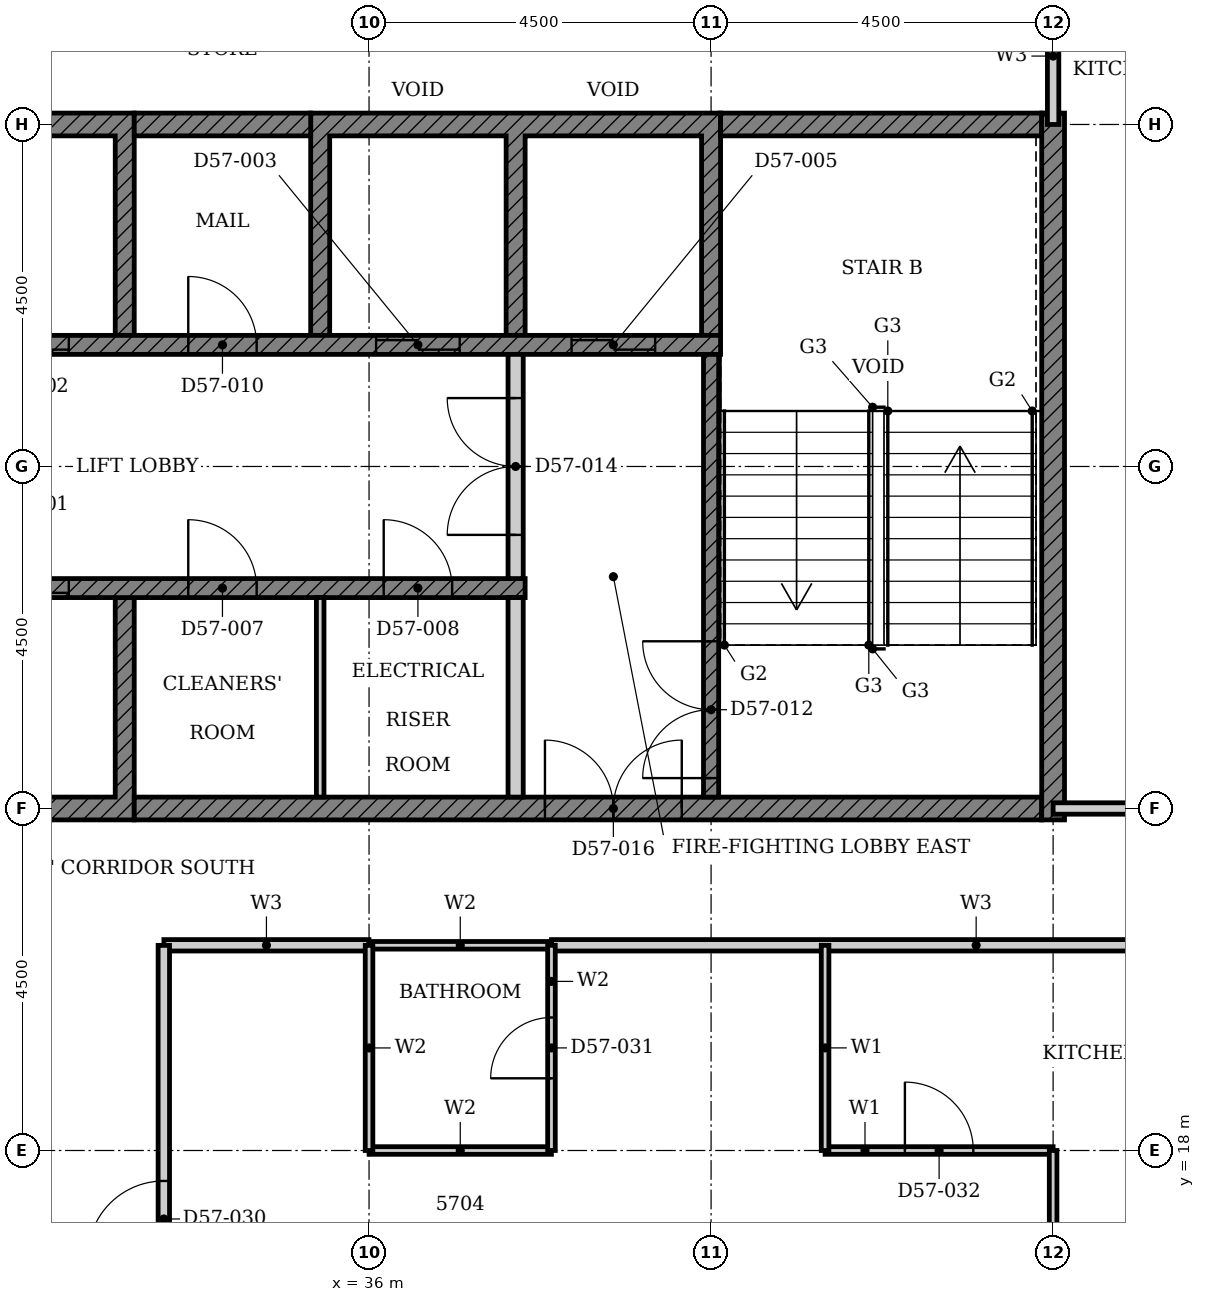
"""IFC4 building model, lengths in metres.
Left out: names, types, materials, properties, quantities, classifications, styles, units other than length and angle.
Written with IfcOpenShell. Run it as: python <this file> out.ifc"""

import sys

from ifc_helpers import new_model, si_unit, direction, frame, frame_2d, origin, place, context, subcontext, project, spatial, polyline, rectangle, outline, extrude, element, fill, save


model = new_model("IFC4")
c1 = context("Model", 3, precision=1e-05, world=origin(), true_north=direction((0.0, 1.0)))
c2 = subcontext(c1, "Body", "Model", "MODEL_VIEW")
j1 = project(units=[si_unit("LENGTHUNIT", "METRE"), si_unit("PLANEANGLEUNIT", "RADIAN")], contexts=[c1])
p1 = place(None, origin())
s1 = spatial("IfcSite", under=j1, at=p1, CompositionType="ELEMENT")
p2 = place(p1, origin())
s2 = spatial("IfcBuilding", under=s1, at=p2, CompositionType="ELEMENT")
p3 = place(p2, frame((0.0, 0.0, 225.7)))
s3 = spatial("IfcBuildingStorey", under=s2, at=p3, CompositionType="ELEMENT", Elevation=225.7)
p4 = place(p3, origin())
e1 = element("IfcWall", 1, at=p4, inside=s3, PredefinedType="SHEAR", context=c2, shape_type="SweptSolid", body=[
    extrude(outline(polyline([(27.518, 22.35), (32.911, 22.35), (32.911, 25.275), (32.661, 25.275), (32.661, 22.65), (30.339, 22.65), (30.339, 25.275), (30.089, 25.275), (30.089, 22.65), (27.768, 22.65), (27.768, 25.275), (27.518, 25.275), (27.518, 22.35)])), origin(), (0.0, 0.0, 1.0), 3.4),
])
p5 = place(p3, origin())
e2 = element("IfcWall", 2, at=p5, inside=s3, PredefinedType="SHEAR", context=c2, shape_type="SweptSolid", body=[
    extrude(outline(polyline([(27.518, 28.725), (27.768, 28.725), (27.768, 31.35), (30.089, 31.35), (30.089, 28.725), (30.339, 28.725), (30.339, 31.35), (32.661, 31.35), (32.661, 28.725), (32.911, 28.725), (32.911, 31.65), (27.518, 31.65), (27.518, 28.725)])), origin(), (0.0, 0.0, 1.0), 3.4),
])
p6 = place(p3, origin())
e3 = element("IfcWall", 3, at=p6, inside=s3, PredefinedType="SHEAR", context=c2, shape_type="SweptSolid", body=[
    extrude(outline(polyline([(35.232, 28.725), (35.482, 28.725), (35.482, 31.35), (37.803, 31.35), (37.803, 28.725), (38.053, 28.725), (38.053, 31.35), (40.375, 31.35), (40.375, 28.725), (40.625, 28.725), (40.625, 31.65), (35.232, 31.65), (35.232, 28.725)])), origin(), (0.0, 0.0, 1.0), 3.4),
])
p7 = place(p3, frame((32.911, 22.5, 0.0), z_axis=(0.0, 0.0, 1.0), x_axis=(1.0, 0.0, 0.0)))
e4 = element("IfcWall", 4, at=p7, inside=s3, PredefinedType="SHEAR", context=c2, shape_type="SweptSolid", body=[
    extrude(rectangle(XDim=11.939, YDim=0.3, at=frame_2d((5.97, 0.0))), origin(), (0.0, 0.0, 1.0), 3.4),
])
p8 = place(p7, frame((5.404, 0.0, 0.0)))
e5 = element("IfcOpeningElement", 5, at=p8, cuts=e4, PredefinedType="OPENING", context=c2, shape_type="SweptSolid", body=[
    extrude(rectangle(XDim=1.8, YDim=2.1, at=frame_2d((0.9, 1.05))), frame((0.0, 0.16, 0.0), z_axis=(0.0, -1.0, 0.0), x_axis=(1.0, 0.0, 0.0)), (0.0, 0.0, 1.0), 0.32),
])
p9 = place(p3, frame((32.911, 31.5, 0.0), z_axis=(0.0, 0.0, 1.0), x_axis=(1.0, 0.0, 0.0)))
e6 = element("IfcWall", 6, at=p9, inside=s3, PredefinedType="SHEAR", context=c2, shape_type="SweptSolid", body=[
    extrude(rectangle(XDim=2.322, YDim=0.3, at=frame_2d((1.161, 0.0))), origin(), (0.0, 0.0, 1.0), 3.4),
])
p10 = place(p3, frame((40.625, 31.5, 0.0), z_axis=(0.0, 0.0, 1.0), x_axis=(1.0, 0.0, 0.0)))
e7 = element("IfcWall", 7, at=p10, inside=s3, PredefinedType="SHEAR", context=c2, shape_type="SweptSolid", body=[
    extrude(rectangle(XDim=4.225, YDim=0.3, at=frame_2d((2.113, 0.0))), origin(), (0.0, 0.0, 1.0), 3.4),
])
p11 = place(p3, frame((45.0, 22.35, 0.0), z_axis=(0.0, 0.0, 1.0), x_axis=(0.0, 1.0, 0.0)))
e8 = element("IfcWall", 8, at=p11, inside=s3, PredefinedType="SHEAR", context=c2, shape_type="SweptSolid", body=[
    extrude(rectangle(XDim=9.3, YDim=0.3, at=frame_2d((4.65, 0.0))), origin(), (0.0, 0.0, 1.0), 3.4),
])
p12 = place(p3, frame((22.375, 25.4, 0.0), z_axis=(0.0, 0.0, 1.0), x_axis=(1.0, 0.0, 0.0)))
e9 = element("IfcWall", 9, at=p12, inside=s3, PredefinedType="SHEAR", context=c2, shape_type="SweptSolid", body=[
    extrude(rectangle(XDim=15.678, YDim=0.25, at=frame_2d((7.839, 0.0))), origin(), (0.0, 0.0, 1.0), 3.4),
])
p13 = place(p12, frame((8.575, 0.0, 0.0)))
e10 = element("IfcOpeningElement", 10, at=p13, cuts=e9, PredefinedType="OPENING", context=c2, shape_type="SweptSolid", body=[
    extrude(rectangle(XDim=1.1, YDim=2.1, at=frame_2d((0.55, 1.05))), frame((0.0, 0.135, 0.0), z_axis=(0.0, -1.0, 0.0), x_axis=(1.0, 0.0, 0.0)), (0.0, 0.0, 1.0), 0.27),
])
p14 = place(p12, frame((0.861, 0.0, 0.0)))
e11 = element("IfcOpeningElement", 11, at=p14, cuts=e9, PredefinedType="OPENING", context=c2, shape_type="SweptSolid", body=[
    extrude(rectangle(XDim=1.1, YDim=2.1, at=frame_2d((0.55, 1.05))), frame((0.0, 0.135, 0.0), z_axis=(0.0, -1.0, 0.0), x_axis=(1.0, 0.0, 0.0)), (0.0, 0.0, 1.0), 0.27),
])
p15 = place(p12, frame((3.532, 0.0, 0.0)))
e12 = element("IfcOpeningElement", 12, at=p15, cuts=e9, PredefinedType="OPENING", context=c2, shape_type="SweptSolid", body=[
    extrude(rectangle(XDim=0.9, YDim=2.1, at=frame_2d((0.45, 1.05))), frame((0.0, 0.135, 0.0), z_axis=(0.0, -1.0, 0.0), x_axis=(1.0, 0.0, 0.0)), (0.0, 0.0, 1.0), 0.27),
])
p16 = place(p12, frame((11.246, 0.0, 0.0)))
e13 = element("IfcOpeningElement", 13, at=p16, cuts=e9, PredefinedType="OPENING", context=c2, shape_type="SweptSolid", body=[
    extrude(rectangle(XDim=0.9, YDim=2.1, at=frame_2d((0.45, 1.05))), frame((0.0, 0.135, 0.0), z_axis=(0.0, -1.0, 0.0), x_axis=(1.0, 0.0, 0.0)), (0.0, 0.0, 1.0), 0.27),
])
p17 = place(p12, frame((13.818, 0.0, 0.0)))
e14 = element("IfcOpeningElement", 14, at=p17, cuts=e9, PredefinedType="OPENING", context=c2, shape_type="SweptSolid", body=[
    extrude(rectangle(XDim=0.9, YDim=2.1, at=frame_2d((0.45, 1.05))), frame((0.0, 0.135, 0.0), z_axis=(0.0, -1.0, 0.0), x_axis=(1.0, 0.0, 0.0)), (0.0, 0.0, 1.0), 0.27),
])
p18 = place(p3, frame((24.947, 28.6, 0.0), z_axis=(0.0, 0.0, 1.0), x_axis=(1.0, 0.0, 0.0)))
e15 = element("IfcWall", 15, at=p18, inside=s3, PredefinedType="SHEAR", context=c2, shape_type="SweptSolid", body=[
    extrude(rectangle(XDim=15.678, YDim=0.25, at=frame_2d((7.839, 0.0))), origin(), (0.0, 0.0, 1.0), 3.4),
])
p19 = place(p18, frame((6.004, 0.0, 0.0)))
e16 = element("IfcOpeningElement", 16, at=p19, cuts=e15, PredefinedType="OPENING", context=c2, shape_type="SweptSolid", body=[
    extrude(rectangle(XDim=1.1, YDim=2.1, at=frame_2d((0.55, 1.05))), frame((0.0, 0.135, 0.0), z_axis=(0.0, -1.0, 0.0), x_axis=(1.0, 0.0, 0.0)), (0.0, 0.0, 1.0), 0.27),
])
p20 = place(p18, frame((11.146, 0.0, 0.0)))
e17 = element("IfcOpeningElement", 17, at=p20, cuts=e15, PredefinedType="OPENING", context=c2, shape_type="SweptSolid", body=[
    extrude(rectangle(XDim=1.1, YDim=2.1, at=frame_2d((0.55, 1.05))), frame((0.0, 0.135, 0.0), z_axis=(0.0, -1.0, 0.0), x_axis=(1.0, 0.0, 0.0)), (0.0, 0.0, 1.0), 0.27),
])
p21 = place(p18, frame((13.718, 0.0, 0.0)))
e18 = element("IfcOpeningElement", 18, at=p21, cuts=e15, PredefinedType="OPENING", context=c2, shape_type="SweptSolid", body=[
    extrude(rectangle(XDim=1.1, YDim=2.1, at=frame_2d((0.55, 1.05))), frame((0.0, 0.135, 0.0), z_axis=(0.0, -1.0, 0.0), x_axis=(1.0, 0.0, 0.0)), (0.0, 0.0, 1.0), 0.27),
])
p22 = place(p18, frame((0.961, 0.0, 0.0)))
e19 = element("IfcOpeningElement", 19, at=p22, cuts=e15, PredefinedType="OPENING", context=c2, shape_type="SweptSolid", body=[
    extrude(rectangle(XDim=0.9, YDim=2.1, at=frame_2d((0.45, 1.05))), frame((0.0, 0.135, 0.0), z_axis=(0.0, -1.0, 0.0), x_axis=(1.0, 0.0, 0.0)), (0.0, 0.0, 1.0), 0.27),
])
p23 = place(p18, frame((8.675, 0.0, 0.0)))
e20 = element("IfcOpeningElement", 20, at=p23, cuts=e15, PredefinedType="OPENING", context=c2, shape_type="SweptSolid", body=[
    extrude(rectangle(XDim=0.9, YDim=2.1, at=frame_2d((0.45, 1.05))), frame((0.0, 0.135, 0.0), z_axis=(0.0, -1.0, 0.0), x_axis=(1.0, 0.0, 0.0)), (0.0, 0.0, 1.0), 0.27),
])
p24 = place(p3, frame((37.928, 22.65, 0.0), z_axis=(0.0, 0.0, 1.0), x_axis=(0.0, 1.0, 0.0)))
e21 = element("IfcWall", 21, at=p24, inside=s3, PredefinedType="PARTITIONING", context=c2, shape_type="SweptSolid", body=[
    extrude(rectangle(XDim=2.625, YDim=0.2, at=frame_2d((1.312, 0.0))), origin(), (0.0, 0.0, 1.0), 3.4),
])
p25 = place(p3, frame((35.357, 22.65, 0.0), z_axis=(0.0, 0.0, 1.0), x_axis=(0.0, 1.0, 0.0)))
e22 = element("IfcWall", 22, at=p25, inside=s3, PredefinedType="PARTITIONING", context=c2, shape_type="SweptSolid", body=[
    extrude(rectangle(XDim=2.625, YDim=0.1, at=frame_2d((1.312, 0.0))), origin(), (0.0, 0.0, 1.0), 3.4),
])
p26 = place(p3, frame((40.5, 22.65, 0.0), z_axis=(0.0, 0.0, 1.0), x_axis=(0.0, 1.0, 0.0)))
e23 = element("IfcWall", 23, at=p26, inside=s3, PredefinedType="SHEAR", context=c2, shape_type="SweptSolid", body=[
    extrude(rectangle(XDim=5.825, YDim=0.2, at=frame_2d((2.913, 0.0))), origin(), (0.0, 0.0, 1.0), 3.4),
])
p27 = place(p26, frame((0.25, 0.0, 0.0)))
e24 = element("IfcOpeningElement", 24, at=p27, cuts=e23, PredefinedType="OPENING", context=c2, shape_type="SweptSolid", body=[
    extrude(rectangle(XDim=1.8, YDim=2.1, at=frame_2d((0.9, 1.05))), frame((0.0, 0.11, 0.0), z_axis=(0.0, -1.0, 0.0), x_axis=(1.0, 0.0, 0.0)), (0.0, 0.0, 1.0), 0.22),
])
p28 = place(p3, frame((37.928, 25.525, 0.0), z_axis=(0.0, 0.0, 1.0), x_axis=(0.0, 1.0, 0.0)))
e25 = element("IfcWall", 25, at=p28, inside=s3, PredefinedType="PARTITIONING", context=c2, shape_type="SweptSolid", body=[
    extrude(rectangle(XDim=2.95, YDim=0.2, at=frame_2d((1.475, 0.0))), origin(), (0.0, 0.0, 1.0), 3.4),
])
p29 = place(p28, frame((0.575, 0.0, 0.0)))
e26 = element("IfcOpeningElement", 26, at=p29, cuts=e25, PredefinedType="OPENING", context=c2, shape_type="SweptSolid", body=[
    extrude(rectangle(XDim=1.8, YDim=2.1, at=frame_2d((0.9, 1.05))), frame((0.0, 0.11, 0.0), z_axis=(0.0, -1.0, 0.0), x_axis=(1.0, 0.0, 0.0)), (0.0, 0.0, 1.0), 0.22),
])
p30 = place(p3, frame((33.301, 20.7, 0.0), z_axis=(0.0, 0.0, 1.0), x_axis=(1.0, 0.0, 0.0)))
e27 = element("IfcWall", 27, at=p30, inside=s3, PredefinedType="PARTITIONING", context=c2, shape_type="SweptSolid", body=[
    extrude(rectangle(XDim=2.698, YDim=0.15, at=frame_2d((1.349, 0.0))), origin(), (0.0, 0.0, 1.0), 3.4),
])
p31 = place(p3, frame((38.4, 20.7, 0.0), z_axis=(0.0, 0.0, 1.0), x_axis=(1.0, 0.0, 0.0)))
e28 = element("IfcWall", 28, at=p31, inside=s3, PredefinedType="PARTITIONING", context=c2, shape_type="SweptSolid", body=[
    extrude(rectangle(XDim=11.175, YDim=0.15, at=frame_2d((5.587, 0.0))), origin(), (0.0, 0.0, 1.0), 3.4),
])
p32 = place(p3, frame((45.0, 22.5, 0.0), z_axis=(0.0, 0.0, 1.0), x_axis=(1.0, 0.0, 0.0)))
e29 = element("IfcWall", 29, at=p32, inside=s3, PredefinedType="PARTITIONING", context=c2, shape_type="SweptSolid", body=[
    extrude(rectangle(XDim=4.765, YDim=0.15, at=frame_2d((2.382, 0.0))), origin(), (0.0, 0.0, 1.0), 3.4),
])
p33 = place(p32, frame((1.75, 0.0, 0.0)))
e30 = element("IfcOpeningElement", 30, at=p33, cuts=e29, PredefinedType="OPENING", context=c2, shape_type="SweptSolid", body=[
    extrude(rectangle(XDim=1.0, YDim=2.2, at=frame_2d((0.5, 1.1))), frame((0.0, 0.085, 0.0), z_axis=(0.0, -1.0, 0.0), x_axis=(1.0, 0.0, 0.0)), (0.0, 0.0, 1.0), 0.17),
])
p34 = place(p3, frame((33.3, 4.5, 0.0), z_axis=(0.0, 0.0, 1.0), x_axis=(0.0, 1.0, 0.0)))
e31 = element("IfcWall", 31, at=p34, inside=s3, PredefinedType="PARTITIONING", context=c2, shape_type="SweptSolid", body=[
    extrude(rectangle(XDim=16.199, YDim=0.15, at=frame_2d((8.1, 0.0))), origin(), (0.0, 0.0, 1.0), 3.4),
])
p35 = place(p34, frame((12.099, 0.0, 0.0)))
e32 = element("IfcOpeningElement", 32, at=p35, cuts=e31, PredefinedType="OPENING", context=c2, shape_type="SweptSolid", body=[
    extrude(rectangle(XDim=1.0, YDim=2.2, at=frame_2d((0.5, 1.1))), frame((0.0, 0.085, 0.0), z_axis=(0.0, -1.0, 0.0), x_axis=(1.0, 0.0, 0.0)), (0.0, 0.0, 1.0), 0.17),
])
p36 = place(p34, frame((4.0, 0.0, 0.0)))
e33 = element("IfcOpeningElement", 33, at=p36, cuts=e31, PredefinedType="OPENING", context=c2, shape_type="SweptSolid", body=[
    extrude(rectangle(XDim=1.0, YDim=2.1, at=frame_2d((0.5, 1.05))), frame((0.0, 0.085, 0.0), z_axis=(0.0, -1.0, 0.0), x_axis=(1.0, 0.0, 0.0)), (0.0, 0.0, 1.0), 0.17),
])
p37 = place(p3, frame((45.0, 31.5, 0.0), z_axis=(0.0, 0.0, 1.0), x_axis=(0.0, 1.0, 0.0)))
e34 = element("IfcWall", 34, at=p37, inside=s3, PredefinedType="PARTITIONING", context=c2, shape_type="SweptSolid", body=[
    extrude(rectangle(XDim=1.8, YDim=0.15, at=frame_2d((0.9, 0.0))), origin(), (0.0, 0.0, 1.0), 3.4),
])
p38 = place(p3, frame((42.0, 18.0, 0.0), z_axis=(0.0, 0.0, 1.0), x_axis=(1.0, 0.0, 0.0)))
e35 = element("IfcWall", 35, at=p38, inside=s3, PredefinedType="PARTITIONING", context=c2, shape_type="SweptSolid", body=[
    extrude(rectangle(XDim=3.0, YDim=0.1, at=frame_2d((1.5, 0.0))), origin(), (0.0, 0.0, 1.0), 3.4),
])
p39 = place(p38, frame((1.05, 0.0, 0.0)))
e36 = element("IfcOpeningElement", 36, at=p39, cuts=e35, PredefinedType="OPENING", context=c2, shape_type="SweptSolid", body=[
    extrude(rectangle(XDim=0.9, YDim=2.1, at=frame_2d((0.45, 1.05))), frame((0.0, 0.06, 0.0), z_axis=(0.0, -1.0, 0.0), x_axis=(1.0, 0.0, 0.0)), (0.0, 0.0, 1.0), 0.12),
])
p40 = place(p3, frame((42.0, 18.0, 0.0), z_axis=(0.0, 0.0, 1.0), x_axis=(0.0, 1.0, 0.0)))
e37 = element("IfcWall", 37, at=p40, inside=s3, PredefinedType="PARTITIONING", context=c2, shape_type="SweptSolid", body=[
    extrude(rectangle(XDim=2.7, YDim=0.1, at=frame_2d((1.35, 0.0))), origin(), (0.0, 0.0, 1.0), 3.4),
])
p41 = place(p3, frame((45.0, 15.56, 0.0), z_axis=(0.0, 0.0, 1.0), x_axis=(0.0, 1.0, 0.0)))
e38 = element("IfcWall", 38, at=p41, inside=s3, PredefinedType="PARTITIONING", context=c2, shape_type="SweptSolid", body=[
    extrude(rectangle(XDim=2.44, YDim=0.1, at=frame_2d((1.22, 0.0))), origin(), (0.0, 0.0, 1.0), 3.4),
])
for number, where, z_axis, x_axis in (
    (39, (36.0, 18.0, 0.0), (0.0, 0.0, 1.0), (1.0, 0.0, 0.0)),
    (40, (36.0, 20.7, 0.0), (0.0, 0.0, 1.0), (1.0, 0.0, 0.0)),
):
    element("IfcWall", number, at=place(p3, frame(where, z_axis=z_axis, x_axis=x_axis)), inside=s3, PredefinedType="PARTITIONING", context=c2, shape_type="SweptSolid", body=[
        extrude(rectangle(XDim=2.4, YDim=0.1, at=frame_2d((1.2, 0.0))), origin(), (0.0, 0.0, 1.0), 3.4),
    ])
p42 = place(p3, frame((36.0, 18.0, 0.0), z_axis=(0.0, 0.0, 1.0), x_axis=(0.0, 1.0, 0.0)))
e41 = element("IfcWall", 41, at=p42, inside=s3, PredefinedType="PARTITIONING", context=c2, shape_type="SweptSolid", body=[
    extrude(rectangle(XDim=2.699, YDim=0.1, at=frame_2d((1.35, 0.0))), origin(), (0.0, 0.0, 1.0), 3.4),
])
p43 = place(p3, frame((38.4, 18.0, 0.0), z_axis=(0.0, 0.0, 1.0), x_axis=(0.0, 1.0, 0.0)))
e42 = element("IfcWall", 42, at=p43, inside=s3, PredefinedType="PARTITIONING", context=c2, shape_type="SweptSolid", body=[
    extrude(rectangle(XDim=2.7, YDim=0.1, at=frame_2d((1.35, 0.0))), origin(), (0.0, 0.0, 1.0), 3.4),
])
p44 = place(p43, frame((0.95, 0.0, 0.0)))
e43 = element("IfcOpeningElement", 43, at=p44, cuts=e42, PredefinedType="OPENING", context=c2, shape_type="SweptSolid", body=[
    extrude(rectangle(XDim=0.8, YDim=2.1, at=frame_2d((0.4, 1.05))), frame((0.0, 0.06, 0.0), z_axis=(0.0, -1.0, 0.0), x_axis=(1.0, 0.0, 0.0)), (0.0, 0.0, 1.0), 0.12),
])
p45 = place(p13, origin())
e44 = element("IfcDoor", 44, at=p45, inside=s3, OperationType="DOUBLE_DOOR_SLIDING", PredefinedType="DOOR", context=c2, shape_type="SweptSolid", body=[
    extrude(rectangle(XDim=1.1, YDim=2.1, at=frame_2d((0.55, 1.05))), frame((0.0, 0.025, 0.0), z_axis=(0.0, -1.0, 0.0), x_axis=(1.0, 0.0, 0.0)), (0.0, 0.0, 1.0), 0.05),
])
fill(e10, e44)
p46 = place(p19, origin())
e45 = element("IfcDoor", 45, at=p46, inside=s3, OperationType="DOUBLE_DOOR_SLIDING", PredefinedType="DOOR", context=c2, shape_type="SweptSolid", body=[
    extrude(rectangle(XDim=1.1, YDim=2.1, at=frame_2d((0.55, 1.05))), frame((0.0, 0.025, 0.0), z_axis=(0.0, -1.0, 0.0), x_axis=(1.0, 0.0, 0.0)), (0.0, 0.0, 1.0), 0.05),
])
fill(e16, e45)
p47 = place(p20, origin())
e46 = element("IfcDoor", 46, at=p47, inside=s3, OperationType="DOUBLE_DOOR_SLIDING", PredefinedType="DOOR", context=c2, shape_type="SweptSolid", body=[
    extrude(rectangle(XDim=1.1, YDim=2.1, at=frame_2d((0.55, 1.05))), frame((0.0, 0.025, 0.0), z_axis=(0.0, -1.0, 0.0), x_axis=(1.0, 0.0, 0.0)), (0.0, 0.0, 1.0), 0.05),
])
fill(e17, e46)
p48 = place(p21, origin())
e47 = element("IfcDoor", 47, at=p48, inside=s3, OperationType="DOUBLE_DOOR_SLIDING", PredefinedType="DOOR", context=c2, shape_type="SweptSolid", body=[
    extrude(rectangle(XDim=1.1, YDim=2.1, at=frame_2d((0.55, 1.05))), frame((0.0, 0.025, 0.0), z_axis=(0.0, -1.0, 0.0), x_axis=(1.0, 0.0, 0.0)), (0.0, 0.0, 1.0), 0.05),
])
fill(e18, e47)
p49 = place(p16, origin())
e48 = element("IfcDoor", 48, at=p49, inside=s3, OperationType="SINGLE_SWING_LEFT", PredefinedType="DOOR", context=c2, shape_type="SweptSolid", body=[
    extrude(rectangle(XDim=0.9, YDim=2.1, at=frame_2d((0.45, 1.05))), frame((0.0, 0.025, 0.0), z_axis=(0.0, -1.0, 0.0), x_axis=(1.0, 0.0, 0.0)), (0.0, 0.0, 1.0), 0.05),
])
fill(e13, e48)
p50 = place(p17, origin())
e49 = element("IfcDoor", 49, at=p50, inside=s3, OperationType="SINGLE_SWING_LEFT", PredefinedType="DOOR", context=c2, shape_type="SweptSolid", body=[
    extrude(rectangle(XDim=0.9, YDim=2.1, at=frame_2d((0.45, 1.05))), frame((0.0, 0.025, 0.0), z_axis=(0.0, -1.0, 0.0), x_axis=(1.0, 0.0, 0.0)), (0.0, 0.0, 1.0), 0.05),
])
fill(e14, e49)
p51 = place(p23, origin())
e50 = element("IfcDoor", 50, at=p51, inside=s3, OperationType="SINGLE_SWING_LEFT", PredefinedType="DOOR", context=c2, shape_type="SweptSolid", body=[
    extrude(rectangle(XDim=0.9, YDim=2.1, at=frame_2d((0.45, 1.05))), frame((0.0, 0.025, 0.0), z_axis=(0.0, -1.0, 0.0), x_axis=(1.0, 0.0, 0.0)), (0.0, 0.0, 1.0), 0.05),
])
fill(e20, e50)
p52 = place(p27, origin())
e51 = element("IfcDoor", 51, at=p52, inside=s3, OperationType="DOUBLE_DOOR_SINGLE_SWING", PredefinedType="DOOR", context=c2, shape_type="SweptSolid", body=[
    extrude(rectangle(XDim=1.8, YDim=2.1, at=frame_2d((0.9, 1.05))), frame((0.0, 0.025, 0.0), z_axis=(0.0, -1.0, 0.0), x_axis=(1.0, 0.0, 0.0)), (0.0, 0.0, 1.0), 0.05),
])
fill(e24, e51)
p53 = place(p29, origin())
e52 = element("IfcDoor", 52, at=p53, inside=s3, OperationType="DOUBLE_DOOR_SINGLE_SWING", PredefinedType="DOOR", context=c2, shape_type="SweptSolid", body=[
    extrude(rectangle(XDim=1.8, YDim=2.1, at=frame_2d((0.9, 1.05))), frame((0.0, 0.025, 0.0), z_axis=(0.0, -1.0, 0.0), x_axis=(1.0, 0.0, 0.0)), (0.0, 0.0, 1.0), 0.05),
])
fill(e26, e52)
p54 = place(p8, origin())
e53 = element("IfcDoor", 53, at=p54, inside=s3, OperationType="DOUBLE_DOOR_SINGLE_SWING", PredefinedType="DOOR", context=c2, shape_type="SweptSolid", body=[
    extrude(rectangle(XDim=1.8, YDim=2.1, at=frame_2d((0.9, 1.05))), frame((0.0, 0.025, 0.0), z_axis=(0.0, -1.0, 0.0), x_axis=(1.0, 0.0, 0.0)), (0.0, 0.0, 1.0), 0.05),
])
fill(e5, e53)
p55 = place(p35, origin())
e54 = element("IfcDoor", 54, at=p55, inside=s3, OperationType="SINGLE_SWING_RIGHT", PredefinedType="DOOR", context=c2, shape_type="SweptSolid", body=[
    extrude(rectangle(XDim=1.0, YDim=2.2, at=frame_2d((0.5, 1.1))), frame((0.0, 0.025, 0.0), z_axis=(0.0, -1.0, 0.0), x_axis=(1.0, 0.0, 0.0)), (0.0, 0.0, 1.0), 0.05),
])
fill(e32, e54)
p56 = place(p44, origin())
e55 = element("IfcDoor", 55, at=p56, inside=s3, OperationType="SINGLE_SWING_LEFT", PredefinedType="DOOR", context=c2, shape_type="SweptSolid", body=[
    extrude(rectangle(XDim=0.8, YDim=2.1, at=frame_2d((0.4, 1.05))), frame((0.0, 0.025, 0.0), z_axis=(0.0, -1.0, 0.0), x_axis=(1.0, 0.0, 0.0)), (0.0, 0.0, 1.0), 0.05),
])
fill(e43, e55)
p57 = place(p39, origin())
e56 = element("IfcDoor", 56, at=p57, inside=s3, OperationType="SINGLE_SWING_LEFT", PredefinedType="DOOR", context=c2, shape_type="SweptSolid", body=[
    extrude(rectangle(XDim=0.9, YDim=2.1, at=frame_2d((0.45, 1.05))), frame((0.0, 0.025, 0.0), z_axis=(0.0, -1.0, 0.0), x_axis=(1.0, 0.0, 0.0)), (0.0, 0.0, 1.0), 0.05),
])
fill(e36, e56)
save(model, sys.argv[1])
